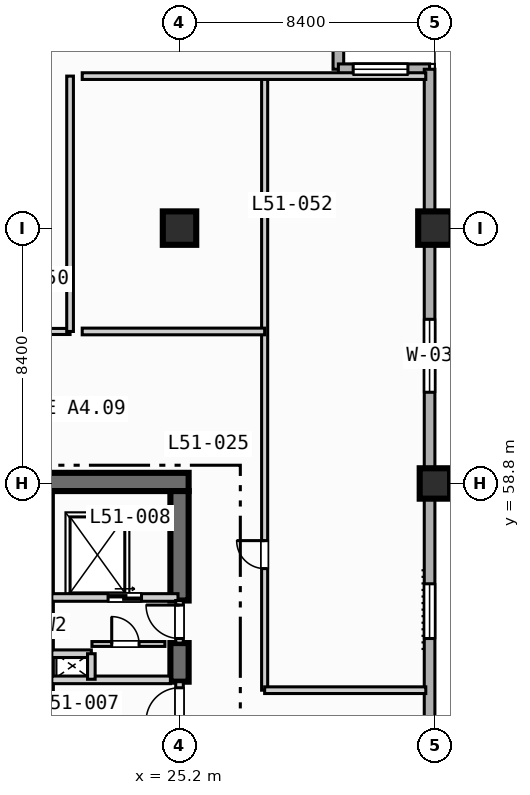
"""IFC4 building model, lengths in metres.
Left out: names, types, materials, properties, quantities, classifications, styles, units other than length and angle.
Written with IfcOpenShell. Run it as: python <this file> out.ifc"""

import sys

from ifc_helpers import new_model, si_unit, direction, frame, frame_2d, origin, origin_2d, place, context, subcontext, project, spatial, rectangle, extrude, element, fill, save


model = new_model("IFC4")
c1 = context("Model", 3, precision=1e-05, world=origin(), true_north=direction((0.0, 1.0)))
c2 = subcontext(c1, "Body", "Model", "MODEL_VIEW")
j1 = project(units=[si_unit("LENGTHUNIT", "METRE"), si_unit("PLANEANGLEUNIT", "RADIAN")], contexts=[c1])
p1 = place(None, origin())
s1 = spatial("IfcSite", under=j1, at=p1, CompositionType="ELEMENT")
p2 = place(p1, origin())
s2 = spatial("IfcBuilding", under=s1, at=p2, CompositionType="ELEMENT")
p3 = place(p2, frame((0.0, 0.0, 208.7)))
s3 = spatial("IfcBuildingStorey", under=s2, at=p3, CompositionType="ELEMENT", Elevation=208.7)
p4 = place(p3, frame((20.5, 58.85, 0.0), z_axis=(0.0, 0.0, 1.0), x_axis=(1.0, 0.0, 0.0)))
e1 = element("IfcWall", 1, at=p4, inside=s3, PredefinedType="SHEAR", context=c2, shape_type="SweptSolid", body=[
    extrude(rectangle(XDim=5.0, YDim=0.6, at=frame_2d((2.5, 0.0))), origin(), (0.0, 0.0, 1.0), 3.47),
])
p5 = place(p3, frame((25.2, 52.28, 0.0), z_axis=(0.0, 0.0, 1.0), x_axis=(0.0, 1.0, 0.0)))
e2 = element("IfcWall", 2, at=p5, inside=s3, PredefinedType="SHEAR", context=c2, shape_type="SweptSolid", body=[
    extrude(rectangle(XDim=1.27, YDim=0.6, at=frame_2d((0.635, 0.0))), origin(), (0.0, 0.0, 1.0), 3.47),
])
p6 = place(p3, frame((25.2, 54.95, 0.0), z_axis=(0.0, 0.0, 1.0), x_axis=(0.0, 1.0, 0.0)))
e3 = element("IfcWall", 3, at=p6, inside=s3, PredefinedType="SHEAR", context=c2, shape_type="SweptSolid", body=[
    extrude(rectangle(XDim=3.6, YDim=0.6, at=frame_2d((1.8, 0.0))), origin(), (0.0, 0.0, 1.0), 3.47),
])
p7 = place(p3, frame((25.2, 67.2, 0.0), z_axis=(0.0, 0.0, 1.0), x_axis=(1.0, 0.0, 0.0)))
e4 = element("IfcColumn", 4, at=p7, inside=s3, PredefinedType="COLUMN", context=c2, shape_type="SweptSolid", body=[
    extrude(rectangle(XDim=1.1, YDim=1.1, at=origin_2d()), origin(), (0.0, 0.0, 1.0), 3.7),
])
p8 = place(p3, frame((33.6, 58.8, 0.0), z_axis=(0.0, 0.0, 1.0), x_axis=(1.0, 0.0, 0.0)))
e5 = element("IfcColumn", 5, at=p8, inside=s3, PredefinedType="COLUMN", context=c2, shape_type="SweptSolid", body=[
    extrude(rectangle(XDim=1.0, YDim=1.0, at=origin_2d()), origin(), (0.0, 0.0, 1.0), 3.7),
])
p9 = place(p3, frame((33.6, 67.2, 0.0), z_axis=(0.0, 0.0, 1.0), x_axis=(1.0, 0.0, 0.0)))
e6 = element("IfcColumn", 6, at=p9, inside=s3, PredefinedType="COLUMN", context=c2, shape_type="SweptSolid", body=[
    extrude(rectangle(XDim=1.1, YDim=1.1, at=origin_2d()), origin(), (0.0, 0.0, 1.0), 3.7),
])
p10 = place(p3, frame((30.425, 75.425, 0.0), z_axis=(0.0, 0.0, 1.0), x_axis=(0.0, -1.0, 0.0)))
e7 = element("IfcWall", 7, at=p10, inside=s3, PredefinedType="STANDARD", context=c2, shape_type="SweptSolid", body=[
    extrude(rectangle(XDim=3.0, YDim=0.35, at=frame_2d((1.5, 0.0))), origin(), (0.0, 0.0, 1.0), 3.47),
])
p11 = place(p3, frame((30.425, 72.425, 0.0), z_axis=(0.0, 0.0, 1.0), x_axis=(1.0, 0.0, 0.0)))
e8 = element("IfcWall", 8, at=p11, inside=s3, PredefinedType="STANDARD", context=c2, shape_type="SweptSolid", body=[
    extrude(rectangle(XDim=3.0, YDim=0.35, at=frame_2d((1.5, 0.0))), origin(), (0.0, 0.0, 1.0), 3.47),
])
p12 = place(p11, frame((0.488, 0.0, 0.85)))
e9 = element("IfcOpeningElement", 9, at=p12, cuts=e8, PredefinedType="OPENING", context=c2, shape_type="SweptSolid", body=[
    extrude(rectangle(XDim=1.8, YDim=1.8, at=frame_2d((0.9, 0.9))), frame((0.0, 0.185, 0.0), z_axis=(0.0, -1.0, 0.0), x_axis=(1.0, 0.0, 0.0)), (0.0, 0.0, 1.0), 0.37),
])
p13 = place(p3, frame((33.425, 72.425, 0.0), z_axis=(0.0, 0.0, 1.0), x_axis=(0.0, -1.0, 0.0)))
e10 = element("IfcWall", 10, at=p13, inside=s3, PredefinedType="STANDARD", context=c2, shape_type="SweptSolid", body=[
    extrude(rectangle(XDim=39.0, YDim=0.35, at=frame_2d((19.5, 0.0))), origin(), (0.0, 0.0, 1.0), 3.47),
])
p14 = place(p13, frame((33.725, 0.0, 0.85)))
e11 = element("IfcOpeningElement", 11, at=p14, cuts=e10, PredefinedType="OPENING", context=c2, shape_type="SweptSolid", body=[
    extrude(rectangle(XDim=1.8, YDim=1.8, at=frame_2d((0.9, 0.9))), frame((0.0, 0.185, 0.0), z_axis=(0.0, -1.0, 0.0), x_axis=(1.0, 0.0, 0.0)), (0.0, 0.0, 1.0), 0.37),
])
p15 = place(p13, frame((16.925, 0.0, 0.85)))
e12 = element("IfcOpeningElement", 12, at=p15, cuts=e10, PredefinedType="OPENING", context=c2, shape_type="SweptSolid", body=[
    extrude(rectangle(XDim=1.8, YDim=1.8, at=frame_2d((0.9, 0.9))), frame((0.0, 0.185, 0.0), z_axis=(0.0, -1.0, 0.0), x_axis=(1.0, 0.0, 0.0)), (0.0, 0.0, 1.0), 0.37),
])
p16 = place(p13, frame((8.225, 0.0, 0.85)))
e13 = element("IfcOpeningElement", 13, at=p16, cuts=e10, PredefinedType="OPENING", context=c2, shape_type="SweptSolid", body=[
    extrude(rectangle(XDim=2.4, YDim=1.95, at=frame_2d((1.2, 0.975))), frame((0.0, 0.185, 0.0), z_axis=(0.0, -1.0, 0.0), x_axis=(1.0, 0.0, 0.0)), (0.0, 0.0, 1.0), 0.37),
])
p17 = place(p3, frame((25.2, 50.8, 0.0), z_axis=(0.0, 0.0, 1.0), x_axis=(0.0, 1.0, 0.0)))
e14 = element("IfcWall", 14, at=p17, inside=s3, PredefinedType="SOLIDWALL", context=c2, shape_type="SweptSolid", body=[
    extrude(rectangle(XDim=1.48, YDim=0.25, at=frame_2d((0.74, 0.0))), origin(), (0.0, 0.0, 1.0), 3.47),
])
p18 = place(p17, frame((0.18, 0.0, 0.0)))
e15 = element("IfcOpeningElement", 15, at=p18, cuts=e14, PredefinedType="OPENING", context=c2, shape_type="SweptSolid", body=[
    extrude(rectangle(XDim=1.1, YDim=2.15, at=frame_2d((0.55, 1.075))), frame((0.0, 0.135, 0.0), z_axis=(0.0, -1.0, 0.0), x_axis=(1.0, 0.0, 0.0)), (0.0, 0.0, 1.0), 0.27),
])
p19 = place(p3, frame((21.0, 52.34, 0.0), z_axis=(0.0, 0.0, 1.0), x_axis=(1.0, 0.0, 0.0)))
e16 = element("IfcWall", 16, at=p19, inside=s3, PredefinedType="SOLIDWALL", context=c2, shape_type="SweptSolid", body=[
    extrude(rectangle(XDim=3.9, YDim=0.25, at=frame_2d((1.95, 0.0))), origin(), (0.0, 0.0, 1.0), 3.47),
])
p20 = place(p3, frame((21.0, 55.05, 0.0), z_axis=(0.0, 0.0, 1.0), x_axis=(1.0, 0.0, 0.0)))
e17 = element("IfcWall", 17, at=p20, inside=s3, PredefinedType="SOLIDWALL", context=c2, shape_type="SweptSolid", body=[
    extrude(rectangle(XDim=4.15, YDim=0.25, at=frame_2d((2.075, 0.0))), origin(), (0.0, 0.0, 1.0), 3.47),
])
p21 = place(p20, frame((1.85, 0.0, 0.0)))
e18 = element("IfcOpeningElement", 18, at=p21, cuts=e17, PredefinedType="OPENING", context=c2, shape_type="SweptSolid", body=[
    extrude(rectangle(XDim=1.1, YDim=2.15, at=frame_2d((0.55, 1.075))), frame((0.0, 0.135, 0.0), z_axis=(0.0, -1.0, 0.0), x_axis=(1.0, 0.0, 0.0)), (0.0, 0.0, 1.0), 0.27),
])
p22 = place(p3, frame((25.2, 53.55, 0.0), z_axis=(0.0, 0.0, 1.0), x_axis=(0.0, 1.0, 0.0)))
e19 = element("IfcWall", 19, at=p22, inside=s3, PredefinedType="SOLIDWALL", context=c2, shape_type="SweptSolid", body=[
    extrude(rectangle(XDim=1.4, YDim=0.25, at=frame_2d((0.7, 0.0))), origin(), (0.0, 0.0, 1.0), 3.47),
])
p23 = place(p22, frame((0.15, 0.0, 0.0)))
e20 = element("IfcOpeningElement", 20, at=p23, cuts=e19, PredefinedType="OPENING", context=c2, shape_type="SweptSolid", body=[
    extrude(rectangle(XDim=1.1, YDim=2.15, at=frame_2d((0.55, 1.075))), frame((0.0, 0.135, 0.0), z_axis=(0.0, -1.0, 0.0), x_axis=(1.0, 0.0, 0.0)), (0.0, 0.0, 1.0), 0.27),
])
p24 = place(p3, frame((21.0, 53.2, 0.0), z_axis=(0.0, 0.0, 1.0), x_axis=(1.0, 0.0, 0.0)))
e21 = element("IfcWall", 21, at=p24, inside=s3, PredefinedType="SOLIDWALL", context=c2, shape_type="SweptSolid", body=[
    extrude(rectangle(XDim=1.3, YDim=0.25, at=frame_2d((0.65, 0.0))), origin(), (0.0, 0.0, 1.0), 3.47),
])
p25 = place(p3, frame((22.3, 52.36, 0.0), z_axis=(0.0, 0.0, 1.0), x_axis=(0.0, 1.0, 0.0)))
e22 = element("IfcWall", 22, at=p25, inside=s3, PredefinedType="SOLIDWALL", context=c2, shape_type="SweptSolid", body=[
    extrude(rectangle(XDim=0.84, YDim=0.25, at=frame_2d((0.42, 0.0))), origin(), (0.0, 0.0, 1.0), 3.47),
])
p26 = place(p3, frame((22.32, 53.52, 0.0), z_axis=(0.0, 0.0, 1.0), x_axis=(1.0, 0.0, 0.0)))
e23 = element("IfcWall", 23, at=p26, inside=s3, PredefinedType="PARTITIONING", context=c2, shape_type="SweptSolid", body=[
    extrude(rectangle(XDim=2.4, YDim=0.16, at=frame_2d((1.2, 0.0))), origin(), (0.0, 0.0, 1.0), 3.47),
])
p27 = place(p26, frame((0.65, 0.0, 0.0)))
e24 = element("IfcOpeningElement", 24, at=p27, cuts=e23, PredefinedType="OPENING", context=c2, shape_type="SweptSolid", body=[
    extrude(rectangle(XDim=0.9, YDim=2.1, at=frame_2d((0.45, 1.05))), frame((0.0, 0.09, 0.0), z_axis=(0.0, -1.0, 0.0), x_axis=(1.0, 0.0, 0.0)), (0.0, 0.0, 1.0), 0.18),
])
p28 = place(p3, frame((3.4, 63.8, 0.0), z_axis=(0.0, 0.0, 1.0), x_axis=(1.0, 0.0, 0.0)))
e25 = element("IfcWall", 25, at=p28, inside=s3, PredefinedType="PARTITIONING", context=c2, shape_type="SweptSolid", body=[
    extrude(rectangle(XDim=18.2, YDim=0.2, at=frame_2d((9.1, 0.0))), origin(), (0.0, 0.0, 1.0), 3.47),
])
p29 = place(p28, frame((4.05, 0.0, 0.0)))
e26 = element("IfcOpeningElement", 26, at=p29, cuts=e25, PredefinedType="OPENING", context=c2, shape_type="SweptSolid", body=[
    extrude(rectangle(XDim=1.0, YDim=2.15, at=frame_2d((0.5, 1.075))), frame((0.0, 0.11, 0.0), z_axis=(0.0, -1.0, 0.0), x_axis=(1.0, 0.0, 0.0)), (0.0, 0.0, 1.0), 0.22),
])
p30 = place(p3, frame((21.6, 63.8, 0.0), z_axis=(0.0, 0.0, 1.0), x_axis=(0.0, 1.0, 0.0)))
e27 = element("IfcWall", 27, at=p30, inside=s3, PredefinedType="PARTITIONING", context=c2, shape_type="SweptSolid", body=[
    extrude(rectangle(XDim=8.4, YDim=0.22, at=frame_2d((4.2, 0.0))), origin(), (0.0, 0.0, 1.0), 3.47),
])
p31 = place(p3, frame((28.0, 52.0, 0.0), z_axis=(0.0, 0.0, 1.0), x_axis=(0.0, 1.0, 0.0)))
e28 = element("IfcWall", 28, at=p31, inside=s3, PredefinedType="PARTITIONING", context=c2, shape_type="SweptSolid", body=[
    extrude(rectangle(XDim=20.2, YDim=0.2, at=frame_2d((10.1, 0.0))), origin(), (0.0, 0.0, 1.0), 3.47),
])
p32 = place(p31, frame((4.0, 0.0, 0.0)))
e29 = element("IfcOpeningElement", 29, at=p32, cuts=e28, PredefinedType="OPENING", context=c2, shape_type="SweptSolid", body=[
    extrude(rectangle(XDim=0.92, YDim=2.1, at=frame_2d((0.46, 1.05))), frame((0.0, 0.11, 0.0), z_axis=(0.0, -1.0, 0.0), x_axis=(1.0, 0.0, 0.0)), (0.0, 0.0, 1.0), 0.22),
])
p33 = place(p3, frame((28.0, 52.0, 0.0), z_axis=(0.0, 0.0, 1.0), x_axis=(1.0, 0.0, 0.0)))
e30 = element("IfcWall", 30, at=p33, inside=s3, PredefinedType="PARTITIONING", context=c2, shape_type="SweptSolid", body=[
    extrude(rectangle(XDim=5.3, YDim=0.22, at=frame_2d((2.65, 0.0))), origin(), (0.0, 0.0, 1.0), 3.47),
])
p34 = place(p3, frame((22.0, 72.2, 0.0), z_axis=(0.0, 0.0, 1.0), x_axis=(1.0, 0.0, 0.0)))
e31 = element("IfcWall", 31, at=p34, inside=s3, PredefinedType="PARTITIONING", context=c2, shape_type="SweptSolid", body=[
    extrude(rectangle(XDim=11.3, YDim=0.22, at=frame_2d((5.65, 0.0))), origin(), (0.0, 0.0, 1.0), 3.47),
])
p35 = place(p3, frame((22.0, 63.8, 0.0), z_axis=(0.0, 0.0, 1.0), x_axis=(1.0, 0.0, 0.0)))
e32 = element("IfcWall", 32, at=p35, inside=s3, PredefinedType="PARTITIONING", context=c2, shape_type="SweptSolid", body=[
    extrude(rectangle(XDim=6.0, YDim=0.22, at=frame_2d((3.0, 0.0))), origin(), (0.0, 0.0, 1.0), 3.47),
])
p36 = place(p12, origin())
e33 = element("IfcWindow", 33, at=p36, inside=s3, PartitioningType="SINGLE_PANEL", PredefinedType="WINDOW", context=c2, shape_type="SweptSolid", body=[
    extrude(rectangle(XDim=1.8, YDim=1.8, at=frame_2d((0.9, 0.9))), frame((0.0, 0.03, 0.0), z_axis=(0.0, -1.0, 0.0), x_axis=(1.0, 0.0, 0.0)), (0.0, 0.0, 1.0), 0.06),
])
fill(e9, e33)
p37 = place(p15, origin())
e34 = element("IfcWindow", 34, at=p37, inside=s3, PartitioningType="SINGLE_PANEL", PredefinedType="WINDOW", context=c2, shape_type="SweptSolid", body=[
    extrude(rectangle(XDim=1.8, YDim=1.8, at=frame_2d((0.9, 0.9))), frame((0.0, 0.03, 0.0), z_axis=(0.0, -1.0, 0.0), x_axis=(1.0, 0.0, 0.0)), (0.0, 0.0, 1.0), 0.06),
])
fill(e12, e34)
p38 = place(p16, origin())
e35 = element("IfcWindow", 35, at=p38, inside=s3, PartitioningType="SINGLE_PANEL", PredefinedType="WINDOW", context=c2, shape_type="SweptSolid", body=[
    extrude(rectangle(XDim=2.4, YDim=1.95, at=frame_2d((1.2, 0.975))), frame((0.0, 0.03, 0.0), z_axis=(0.0, -1.0, 0.0), x_axis=(1.0, 0.0, 0.0)), (0.0, 0.0, 1.0), 0.06),
])
fill(e13, e35)
p39 = place(p18, origin())
e36 = element("IfcDoor", 36, at=p39, inside=s3, OperationType="SINGLE_SWING_LEFT", PredefinedType="DOOR", context=c2, shape_type="SweptSolid", body=[
    extrude(rectangle(XDim=1.1, YDim=2.15, at=frame_2d((0.55, 1.075))), frame((0.0, 0.025, 0.0), z_axis=(0.0, -1.0, 0.0), x_axis=(1.0, 0.0, 0.0)), (0.0, 0.0, 1.0), 0.05),
])
fill(e15, e36)
p40 = place(p21, origin())
e37 = element("IfcDoor", 37, at=p40, inside=s3, OperationType="SLIDING_TO_LEFT", PredefinedType="DOOR", context=c2, shape_type="SweptSolid", body=[
    extrude(rectangle(XDim=1.1, YDim=2.15, at=frame_2d((0.55, 1.075))), frame((0.0, 0.025, 0.0), z_axis=(0.0, -1.0, 0.0), x_axis=(1.0, 0.0, 0.0)), (0.0, 0.0, 1.0), 0.05),
])
fill(e18, e37)
p41 = place(p23, origin())
e38 = element("IfcDoor", 38, at=p41, inside=s3, OperationType="SINGLE_SWING_RIGHT", PredefinedType="DOOR", context=c2, shape_type="SweptSolid", body=[
    extrude(rectangle(XDim=1.1, YDim=2.15, at=frame_2d((0.55, 1.075))), frame((0.0, 0.025, 0.0), z_axis=(0.0, -1.0, 0.0), x_axis=(1.0, 0.0, 0.0)), (0.0, 0.0, 1.0), 0.05),
])
fill(e20, e38)
p42 = place(p27, origin())
e39 = element("IfcDoor", 39, at=p42, inside=s3, OperationType="SINGLE_SWING_LEFT", PredefinedType="DOOR", context=c2, shape_type="SweptSolid", body=[
    extrude(rectangle(XDim=0.9, YDim=2.1, at=frame_2d((0.45, 1.05))), frame((0.0, 0.025, 0.0), z_axis=(0.0, -1.0, 0.0), x_axis=(1.0, 0.0, 0.0)), (0.0, 0.0, 1.0), 0.05),
])
fill(e24, e39)
p43 = place(p32, origin())
e40 = element("IfcDoor", 40, at=p43, inside=s3, OperationType="SINGLE_SWING_RIGHT", PredefinedType="DOOR", context=c2, shape_type="SweptSolid", body=[
    extrude(rectangle(XDim=0.92, YDim=2.1, at=frame_2d((0.46, 1.05))), frame((0.0, 0.025, 0.0), z_axis=(0.0, -1.0, 0.0), x_axis=(1.0, 0.0, 0.0)), (0.0, 0.0, 1.0), 0.05),
])
fill(e29, e40)
save(model, sys.argv[1])
